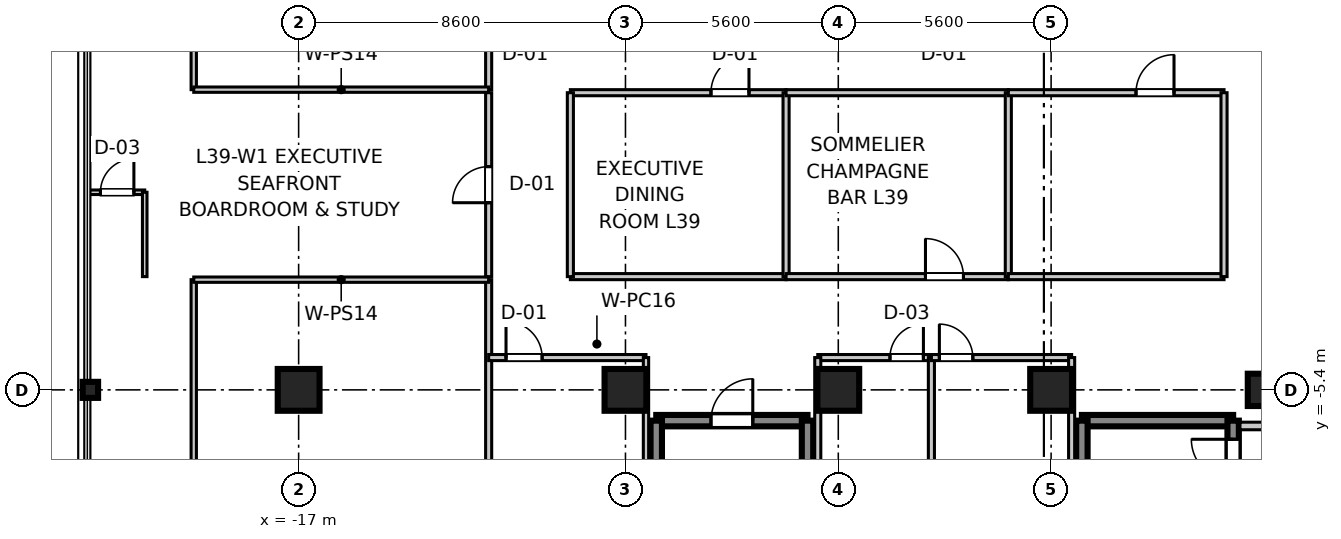
"""IFC4 building model, lengths in metres.
Left out: names, types, materials, properties, quantities, classifications, styles, units other than length and angle.
Written with IfcOpenShell. Run it as: python <this file> out.ifc"""

import sys

from ifc_helpers import new_model, si_unit, direction, frame, frame_2d, origin, origin_2d, place, context, subcontext, project, spatial, rectangle, i_section, extrude, source, transform, mapped, element, fill, save


model = new_model("IFC4")
c1 = context("Model", 3, precision=1e-05, world=origin(), true_north=direction((0.0, 1.0)))
c2 = subcontext(c1, "Body", "Model", "MODEL_VIEW")
j1 = project(units=[si_unit("LENGTHUNIT", "METRE"), si_unit("PLANEANGLEUNIT", "RADIAN")], contexts=[c1])
p1 = place(None, origin())
s1 = spatial("IfcSite", under=j1, at=p1, CompositionType="ELEMENT")
p2 = place(p1, origin())
s2 = spatial("IfcBuilding", under=s1, at=p2, CompositionType="ELEMENT")
p3 = place(p2, frame((0.0, 0.0, 156.3)))
s3 = spatial("IfcBuildingStorey", under=s2, at=p3, CompositionType="ELEMENT", Elevation=156.3)
m1 = source(origin(), c2, "Body", "SweptSolid", [
    extrude(rectangle(XDim=1.1, YDim=1.1, at=origin_2d()), origin(), (0.0, 0.0, 1.0), 3.605),
])
for number, where, z_axis, x_axis in (
    (1, (-17.0, -5.4, 0.0), (0.0, 0.0, 1.0), (1.0, 0.0, 0.0)),
    (2, (-8.4, -5.4, 0.0), (0.0, 0.0, 1.0), (1.0, 0.0, 0.0)),
    (3, (-2.8, -5.4, 0.0), (0.0, 0.0, 1.0), (1.0, 0.0, 0.0)),
    (4, (2.8, -5.4, 0.0), (0.0, 0.0, 1.0), (1.0, 0.0, 0.0)),
):
    element("IfcColumn", number, at=place(p3, frame(where, z_axis=z_axis, x_axis=x_axis)), inside=s3, PredefinedType="COLUMN", context=c2, shape_type="MappedRepresentation", body=[
        mapped(m1, transform((0.0, 0.0, 0.0), scale=1.0)),
    ])
m2 = source(origin(), c2, "Body", "SweptSolid", [
    extrude(rectangle(XDim=0.85, YDim=0.85, at=origin_2d()), origin(), (0.0, 0.0, 1.0), 3.605),
])
p4 = place(p3, frame((8.4, -5.4, 0.0), z_axis=(0.0, 0.0, 1.0), x_axis=(1.0, 0.0, 0.0)))
e5 = element("IfcColumn", 5, at=p4, inside=s3, PredefinedType="PILASTER", context=c2, shape_type="MappedRepresentation", body=[
    mapped(m2, transform((0.0, 0.0, 0.0), scale=1.0)),
])
m3 = source(origin(), c2, "Body", "SweptSolid", [
    extrude(i_section(OverallWidth=0.406, OverallDepth=0.422, WebThickness=0.019, FlangeThickness=0.03, at=origin_2d()), origin(), (0.0, 0.0, 1.0), 3.605),
])
p5 = place(p3, frame((-22.48, -5.4, 0.0), z_axis=(0.0, 0.0, 1.0), x_axis=(1.0, 0.0, 0.0)))
e6 = element("IfcColumn", 6, at=p5, inside=s3, PredefinedType="COLUMN", context=c2, shape_type="MappedRepresentation", body=[
    mapped(m3, transform((0.0, 0.0, 0.0), scale=1.0)),
])
m4 = source(origin(), c2, "Body", "SweptSolid", [
    extrude(rectangle(XDim=3.98, YDim=0.3, at=frame_2d((1.99, 0.0))), origin(), (0.0, 0.0, 1.0), 3.39),
])
p6 = place(p3, frame((3.61, -6.21, 0.0), z_axis=(0.0, 0.0, 1.0), x_axis=(1.0, 0.0, 0.0)))
e7 = element("IfcWall", 7, at=p6, inside=s3, PredefinedType="SHEAR", context=c2, shape_type="MappedRepresentation", body=[
    mapped(m4, transform((0.0, 0.0, 0.0), scale=1.0)),
])
m5 = source(origin(), c2, "Body", "SweptSolid", [
    extrude(rectangle(XDim=9.38, YDim=0.3, at=frame_2d((4.69, 0.0))), origin(), (0.0, 0.0, 1.0), 3.39),
])
p7 = place(p3, frame((3.61, -15.59, 0.0), z_axis=(0.0, 0.0, 1.0), x_axis=(0.0, 1.0, 0.0)))
e8 = element("IfcWall", 8, at=p7, inside=s3, PredefinedType="SHEAR", context=c2, shape_type="MappedRepresentation", body=[
    mapped(m5, transform((0.0, 0.0, 0.0), scale=1.0)),
])
p8 = place(p3, frame((7.59, -15.59, 0.0), z_axis=(0.0, 0.0, 1.0), x_axis=(0.0, 1.0, 0.0)))
e9 = element("IfcWall", 9, at=p8, inside=s3, PredefinedType="SHEAR", context=c2, shape_type="MappedRepresentation", body=[
    mapped(m5, transform((0.0, 0.0, 0.0), scale=1.0)),
])
p9 = place(p8, frame((7.79, 0.0, 0.0)))
e10 = element("IfcOpeningElement", 10, at=p9, cuts=e9, PredefinedType="OPENING", context=c2, shape_type="SweptSolid", body=[
    extrude(rectangle(XDim=1.1, YDim=2.15, at=frame_2d((0.55, 1.075))), frame((0.0, 0.16, 0.0), z_axis=(0.0, -1.0, 0.0), x_axis=(1.0, 0.0, 0.0)), (0.0, 0.0, 1.0), 0.32),
])
p10 = place(p3, frame((-7.59, -6.21, 0.0), z_axis=(0.0, 0.0, 1.0), x_axis=(1.0, 0.0, 0.0)))
e11 = element("IfcWall", 11, at=p10, inside=s3, PredefinedType="SHEAR", context=c2, shape_type="MappedRepresentation", body=[
    mapped(m4, transform((0.0, 0.0, 0.0), scale=1.0)),
])
p11 = place(p10, frame((1.44, 0.0, 0.0)))
e12 = element("IfcOpeningElement", 12, at=p11, cuts=e11, PredefinedType="OPENING", context=c2, shape_type="SweptSolid", body=[
    extrude(rectangle(XDim=1.1, YDim=2.15, at=frame_2d((0.55, 1.075))), frame((0.0, 0.16, 0.0), z_axis=(0.0, -1.0, 0.0), x_axis=(1.0, 0.0, 0.0)), (0.0, 0.0, 1.0), 0.32),
])
for number, where, z_axis, x_axis in (
    (13, (-7.59, -15.59, 0.0), (0.0, 0.0, 1.0), (0.0, 1.0, 0.0)),
    (14, (-3.61, -15.59, 0.0), (0.0, 0.0, 1.0), (0.0, 1.0, 0.0)),
):
    element("IfcWall", number, at=place(p3, frame(where, z_axis=z_axis, x_axis=x_axis)), inside=s3, PredefinedType="SHEAR", context=c2, shape_type="MappedRepresentation", body=[
        mapped(m5, transform((0.0, 0.0, 0.0), scale=1.0)),
    ])
m6 = source(origin(), c2, "Body", "SweptSolid", [
    extrude(rectangle(XDim=0.97, YDim=0.2, at=frame_2d((0.485, 0.0))), origin(), (0.0, 0.0, 1.0), 2.73),
])
p12 = place(p3, frame((7.77, -6.35, 0.0), z_axis=(0.0, 0.0, 1.0), x_axis=(1.0, 0.0, 0.0)))
e15 = element("IfcWall", 15, at=p12, inside=s3, PredefinedType="PARTITIONING", context=c2, shape_type="MappedRepresentation", body=[
    mapped(m6, transform((0.0, 0.0, 0.0), scale=1.0)),
])
m7 = source(origin(), c2, "Body", "SweptSolid", [
    extrude(rectangle(XDim=20.0, YDim=0.16, at=frame_2d((10.0, 0.0))), origin(), (0.0, 0.0, 1.0), 2.73),
])
p13 = place(p3, frame((-12.0, 2.5, 0.0), z_axis=(0.0, 0.0, 1.0), x_axis=(0.0, 1.0, 0.0)))
e16 = element("IfcWall", 16, at=p13, inside=s3, PredefinedType="PARTITIONING", context=c2, shape_type="MappedRepresentation", body=[
    mapped(m7, transform((0.0, 0.0, 0.0), scale=1.0)),
])
p14 = place(p13, frame((8.265, 0.0, 0.0)))
e17 = element("IfcOpeningElement", 17, at=p14, cuts=e16, PredefinedType="OPENING", context=c2, shape_type="SweptSolid", body=[
    extrude(rectangle(XDim=0.95, YDim=2.1, at=frame_2d((0.475, 1.05))), frame((0.0, 0.09, 0.0), z_axis=(0.0, -1.0, 0.0), x_axis=(1.0, 0.0, 0.0)), (0.0, 0.0, 1.0), 0.18),
])
m8 = source(origin(), c2, "Body", "SweptSolid", [
    extrude(rectangle(XDim=18.58, YDim=0.14, at=frame_2d((9.29, 0.0))), origin(), (0.0, 0.0, 1.0), 2.73),
])
p15 = place(p3, frame((-19.76, 2.5, 0.0), z_axis=(0.0, 0.0, 1.0), x_axis=(0.0, 1.0, 0.0)))
e18 = element("IfcWall", 18, at=p15, inside=s3, PredefinedType="PARTITIONING", context=c2, shape_type="MappedRepresentation", body=[
    mapped(m8, transform((0.0, 0.0, 0.0), scale=1.0)),
])
m9 = source(origin(), c2, "Body", "SweptSolid", [
    extrude(rectangle(XDim=7.76, YDim=0.14, at=frame_2d((3.88, 0.0))), origin(), (0.0, 0.0, 1.0), 2.73),
])
p16 = place(p3, frame((-19.76, 2.5, 0.0), z_axis=(0.0, 0.0, 1.0), x_axis=(1.0, 0.0, 0.0)))
e19 = element("IfcWall", 19, at=p16, inside=s3, PredefinedType="PARTITIONING", context=c2, shape_type="MappedRepresentation", body=[
    mapped(m9, transform((0.0, 0.0, 0.0), scale=1.0)),
])
p17 = place(p3, frame((-12.0, -22.5, 0.0), z_axis=(0.0, 0.0, 1.0), x_axis=(0.0, 1.0, 0.0)))
e20 = element("IfcWall", 20, at=p17, inside=s3, PredefinedType="PARTITIONING", context=c2, shape_type="MappedRepresentation", body=[
    mapped(m7, transform((0.0, 0.0, 0.0), scale=1.0)),
])
p18 = place(p17, frame((10.785, 0.0, 0.0)))
e21 = element("IfcOpeningElement", 21, at=p18, cuts=e20, PredefinedType="OPENING", context=c2, shape_type="SweptSolid", body=[
    extrude(rectangle(XDim=0.95, YDim=2.1, at=frame_2d((0.475, 1.05))), frame((0.0, 0.09, 0.0), z_axis=(0.0, -1.0, 0.0), x_axis=(1.0, 0.0, 0.0)), (0.0, 0.0, 1.0), 0.18),
])
p19 = place(p3, frame((-19.76, -21.08, 0.0), z_axis=(0.0, 0.0, 1.0), x_axis=(0.0, 1.0, 0.0)))
e22 = element("IfcWall", 22, at=p19, inside=s3, PredefinedType="PARTITIONING", context=c2, shape_type="MappedRepresentation", body=[
    mapped(m8, transform((0.0, 0.0, 0.0), scale=1.0)),
])
p20 = place(p3, frame((-19.76, -2.5, 0.0), z_axis=(0.0, 0.0, 1.0), x_axis=(1.0, 0.0, 0.0)))
e23 = element("IfcWall", 23, at=p20, inside=s3, PredefinedType="PARTITIONING", context=c2, shape_type="MappedRepresentation", body=[
    mapped(m9, transform((0.0, 0.0, 0.0), scale=1.0)),
])
m10 = source(origin(), c2, "Body", "SweptSolid", [
    extrude(rectangle(XDim=4.14, YDim=0.16, at=frame_2d((2.07, 0.0))), origin(), (0.0, 0.0, 1.0), 2.73),
])
p21 = place(p3, frame((-12.0, -4.55, 0.0), z_axis=(0.0, 0.0, 1.0), x_axis=(1.0, 0.0, 0.0)))
e24 = element("IfcWall", 24, at=p21, inside=s3, PredefinedType="PARTITIONING", context=c2, shape_type="MappedRepresentation", body=[
    mapped(m10, transform((0.0, 0.0, 0.0), scale=1.0)),
])
p22 = place(p21, frame((0.457, 0.0, 0.0)))
e25 = element("IfcOpeningElement", 25, at=p22, cuts=e24, PredefinedType="OPENING", context=c2, shape_type="SweptSolid", body=[
    extrude(rectangle(XDim=0.95, YDim=2.1, at=frame_2d((0.475, 1.05))), frame((0.0, 0.09, 0.0), z_axis=(0.0, -1.0, 0.0), x_axis=(1.0, 0.0, 0.0)), (0.0, 0.0, 1.0), 0.18),
])
m11 = source(origin(), c2, "Body", "SweptSolid", [
    extrude(rectangle(XDim=17.95, YDim=0.14, at=frame_2d((8.975, 0.0))), origin(), (0.0, 0.0, 1.0), 2.73),
])
p23 = place(p3, frame((-7.86, -22.5, 0.0), z_axis=(0.0, 0.0, 1.0), x_axis=(0.0, 1.0, 0.0)))
e26 = element("IfcWall", 26, at=p23, inside=s3, PredefinedType="PARTITIONING", context=c2, shape_type="MappedRepresentation", body=[
    mapped(m11, transform((0.0, 0.0, 0.0), scale=1.0)),
])
m12 = source(origin(), c2, "Body", "SweptSolid", [
    extrude(rectangle(XDim=2.99, YDim=0.16, at=frame_2d((1.495, 0.0))), origin(), (0.0, 0.0, 1.0), 2.73),
])
p24 = place(p3, frame((-3.34, -4.55, 0.0), z_axis=(0.0, 0.0, 1.0), x_axis=(1.0, 0.0, 0.0)))
e27 = element("IfcWall", 27, at=p24, inside=s3, PredefinedType="PARTITIONING", context=c2, shape_type="MappedRepresentation", body=[
    mapped(m12, transform((0.0, 0.0, 0.0), scale=1.0)),
])
p25 = place(p24, frame((1.9, 0.0, 0.0)))
e28 = element("IfcOpeningElement", 28, at=p25, cuts=e27, PredefinedType="OPENING", context=c2, shape_type="SweptSolid", body=[
    extrude(rectangle(XDim=0.88, YDim=2.1, at=frame_2d((0.44, 1.05))), frame((0.0, 0.09, 0.0), z_axis=(0.0, -1.0, 0.0), x_axis=(1.0, 0.0, 0.0)), (0.0, 0.0, 1.0), 0.18),
])
m13 = source(origin(), c2, "Body", "SweptSolid", [
    extrude(rectangle(XDim=17.95, YDim=0.16, at=frame_2d((8.975, 0.0))), origin(), (0.0, 0.0, 1.0), 2.73),
])
for number, where, z_axis, x_axis in (
    (29, (-3.34, -22.5, 0.0), (0.0, 0.0, 1.0), (0.0, 1.0, 0.0)),
    (30, (-0.35, -22.5, 0.0), (0.0, 0.0, 1.0), (0.0, 1.0, 0.0)),
):
    element("IfcWall", number, at=place(p3, frame(where, z_axis=z_axis, x_axis=x_axis)), inside=s3, PredefinedType="PARTITIONING", context=c2, shape_type="MappedRepresentation", body=[
        mapped(m13, transform((0.0, 0.0, 0.0), scale=1.0)),
    ])
m14 = source(origin(), c2, "Body", "SweptSolid", [
    extrude(rectangle(XDim=3.69, YDim=0.16, at=frame_2d((1.845, 0.0))), origin(), (0.0, 0.0, 1.0), 2.73),
])
p26 = place(p3, frame((-0.35, -4.55, 0.0), z_axis=(0.0, 0.0, 1.0), x_axis=(1.0, 0.0, 0.0)))
e31 = element("IfcWall", 31, at=p26, inside=s3, PredefinedType="PARTITIONING", context=c2, shape_type="MappedRepresentation", body=[
    mapped(m14, transform((0.0, 0.0, 0.0), scale=1.0)),
])
p27 = place(p26, frame((0.21, 0.0, 0.0)))
e32 = element("IfcOpeningElement", 32, at=p27, cuts=e31, PredefinedType="OPENING", context=c2, shape_type="SweptSolid", body=[
    extrude(rectangle(XDim=0.88, YDim=2.1, at=frame_2d((0.44, 1.05))), frame((0.0, 0.09, 0.0), z_axis=(0.0, -1.0, 0.0), x_axis=(1.0, 0.0, 0.0)), (0.0, 0.0, 1.0), 0.18),
])
p28 = place(p3, frame((3.34, -22.5, 0.0), z_axis=(0.0, 0.0, 1.0), x_axis=(0.0, 1.0, 0.0)))
e33 = element("IfcWall", 33, at=p28, inside=s3, PredefinedType="PARTITIONING", context=c2, shape_type="MappedRepresentation", body=[
    mapped(m13, transform((0.0, 0.0, 0.0), scale=1.0)),
])
m15 = source(origin(), c2, "Body", "SweptSolid", [
    extrude(rectangle(XDim=4.84, YDim=0.16, at=frame_2d((2.42, 0.0))), origin(), (0.0, 0.0, 1.0), 2.73),
])
p29 = place(p3, frame((-12.0, -2.42, 0.0), z_axis=(0.0, 0.0, 1.0), x_axis=(0.0, 1.0, 0.0)))
e34 = element("IfcWall", 34, at=p29, inside=s3, PredefinedType="PARTITIONING", context=c2, shape_type="MappedRepresentation", body=[
    mapped(m15, transform((0.0, 0.0, 0.0), scale=1.0)),
])
p30 = place(p29, frame((1.945, 0.0, 0.0)))
e35 = element("IfcOpeningElement", 35, at=p30, cuts=e34, PredefinedType="OPENING", context=c2, shape_type="SweptSolid", body=[
    extrude(rectangle(XDim=0.95, YDim=2.1, at=frame_2d((0.475, 1.05))), frame((0.0, 0.09, 0.0), z_axis=(0.0, -1.0, 0.0), x_axis=(1.0, 0.0, 0.0)), (0.0, 0.0, 1.0), 0.18),
])
m16 = source(origin(), c2, "Body", "SweptSolid", [
    extrude(rectangle(XDim=1.45, YDim=0.12, at=frame_2d((0.725, 0.0))), origin(), (0.0, 0.0, 1.0), 2.73),
])
p31 = place(p3, frame((-22.5, -0.2, 0.0), z_axis=(0.0, 0.0, 1.0), x_axis=(1.0, 0.0, 0.0)))
e36 = element("IfcWall", 36, at=p31, inside=s3, PredefinedType="PARTITIONING", context=c2, shape_type="MappedRepresentation", body=[
    mapped(m16, transform((0.0, 0.0, 0.0), scale=1.0)),
])
p32 = place(p31, frame((0.285, 0.0, 0.0)))
e37 = element("IfcOpeningElement", 37, at=p32, cuts=e36, PredefinedType="OPENING", context=c2, shape_type="SweptSolid", body=[
    extrude(rectangle(XDim=0.88, YDim=2.1, at=frame_2d((0.44, 1.05))), frame((0.0, 0.07, 0.0), z_axis=(0.0, -1.0, 0.0), x_axis=(1.0, 0.0, 0.0)), (0.0, 0.0, 1.0), 0.14),
])
m17 = source(origin(), c2, "Body", "SweptSolid", [
    extrude(rectangle(XDim=2.22, YDim=0.12, at=frame_2d((1.11, 0.0))), origin(), (0.0, 0.0, 1.0), 2.73),
])
p33 = place(p3, frame((-21.05, -2.42, 0.0), z_axis=(0.0, 0.0, 1.0), x_axis=(0.0, 1.0, 0.0)))
e38 = element("IfcWall", 38, at=p33, inside=s3, PredefinedType="PARTITIONING", context=c2, shape_type="MappedRepresentation", body=[
    mapped(m17, transform((0.0, 0.0, 0.0), scale=1.0)),
])
m18 = source(origin(), c2, "Body", "SweptSolid", [
    extrude(rectangle(XDim=5.676, YDim=0.16, at=frame_2d((2.838, 0.0))), origin(), (0.0, 0.0, 1.0), 2.73),
])
p34 = place(p3, frame((-9.85, -2.42, 0.0), z_axis=(0.0, 0.0, 1.0), x_axis=(1.0, 0.0, 0.0)))
e39 = element("IfcWall", 39, at=p34, inside=s3, PredefinedType="PARTITIONING", context=c2, shape_type="MappedRepresentation", body=[
    mapped(m18, transform((0.0, 0.0, 0.0), scale=1.0)),
])
p35 = place(p3, frame((-9.85, 2.42, 0.0), z_axis=(0.0, 0.0, 1.0), x_axis=(1.0, 0.0, 0.0)))
e40 = element("IfcWall", 40, at=p35, inside=s3, PredefinedType="PARTITIONING", context=c2, shape_type="MappedRepresentation", body=[
    mapped(m18, transform((0.0, 0.0, 0.0), scale=1.0)),
])
p36 = place(p35, frame((3.7, 0.0, 0.0)))
e41 = element("IfcOpeningElement", 41, at=p36, cuts=e40, PredefinedType="OPENING", context=c2, shape_type="SweptSolid", body=[
    extrude(rectangle(XDim=1.0, YDim=2.1, at=frame_2d((0.5, 1.05))), frame((0.0, 0.09, 0.0), z_axis=(0.0, -1.0, 0.0), x_axis=(1.0, 0.0, 0.0)), (0.0, 0.0, 1.0), 0.18),
])
for number, where, z_axis, x_axis in (
    (42, (-9.85, -2.42, 0.0), (0.0, 0.0, 1.0), (0.0, 1.0, 0.0)),
    (43, (-4.174, -2.42, 0.0), (0.0, 0.0, 1.0), (0.0, 1.0, 0.0)),
):
    element("IfcWall", number, at=place(p3, frame(where, z_axis=z_axis, x_axis=x_axis)), inside=s3, PredefinedType="PARTITIONING", context=c2, shape_type="MappedRepresentation", body=[
        mapped(m15, transform((0.0, 0.0, 0.0), scale=1.0)),
    ])
m19 = source(origin(), c2, "Body", "SweptSolid", [
    extrude(rectangle(XDim=5.848, YDim=0.16, at=frame_2d((2.924, 0.0))), origin(), (0.0, 0.0, 1.0), 2.73),
])
p37 = place(p3, frame((-4.174, -2.42, 0.0), z_axis=(0.0, 0.0, 1.0), x_axis=(1.0, 0.0, 0.0)))
e44 = element("IfcWall", 44, at=p37, inside=s3, PredefinedType="PARTITIONING", context=c2, shape_type="MappedRepresentation", body=[
    mapped(m19, transform((0.0, 0.0, 0.0), scale=1.0)),
])
p38 = place(p37, frame((3.668, 0.0, 0.0)))
e45 = element("IfcOpeningElement", 45, at=p38, cuts=e44, PredefinedType="OPENING", context=c2, shape_type="SweptSolid", body=[
    extrude(rectangle(XDim=1.0, YDim=2.1, at=frame_2d((0.5, 1.05))), frame((0.0, 0.09, 0.0), z_axis=(0.0, -1.0, 0.0), x_axis=(1.0, 0.0, 0.0)), (0.0, 0.0, 1.0), 0.18),
])
p39 = place(p3, frame((-4.174, 2.42, 0.0), z_axis=(0.0, 0.0, 1.0), x_axis=(1.0, 0.0, 0.0)))
e46 = element("IfcWall", 46, at=p39, inside=s3, PredefinedType="PARTITIONING", context=c2, shape_type="MappedRepresentation", body=[
    mapped(m19, transform((0.0, 0.0, 0.0), scale=1.0)),
])
p40 = place(p3, frame((1.674, -2.42, 0.0), z_axis=(0.0, 0.0, 1.0), x_axis=(0.0, 1.0, 0.0)))
e47 = element("IfcWall", 47, at=p40, inside=s3, PredefinedType="PARTITIONING", context=c2, shape_type="MappedRepresentation", body=[
    mapped(m15, transform((0.0, 0.0, 0.0), scale=1.0)),
])
p41 = place(p3, frame((1.674, -2.42, 0.0), z_axis=(0.0, 0.0, 1.0), x_axis=(1.0, 0.0, 0.0)))
e48 = element("IfcWall", 48, at=p41, inside=s3, PredefinedType="PARTITIONING", context=c2, shape_type="MappedRepresentation", body=[
    mapped(m18, transform((0.0, 0.0, 0.0), scale=1.0)),
])
p42 = place(p3, frame((1.674, 2.42, 0.0), z_axis=(0.0, 0.0, 1.0), x_axis=(1.0, 0.0, 0.0)))
e49 = element("IfcWall", 49, at=p42, inside=s3, PredefinedType="PARTITIONING", context=c2, shape_type="MappedRepresentation", body=[
    mapped(m18, transform((0.0, 0.0, 0.0), scale=1.0)),
])
p43 = place(p42, frame((3.36, 0.0, 0.0)))
e50 = element("IfcOpeningElement", 50, at=p43, cuts=e49, PredefinedType="OPENING", context=c2, shape_type="SweptSolid", body=[
    extrude(rectangle(XDim=1.0, YDim=2.1, at=frame_2d((0.5, 1.05))), frame((0.0, 0.09, 0.0), z_axis=(0.0, -1.0, 0.0), x_axis=(1.0, 0.0, 0.0)), (0.0, 0.0, 1.0), 0.18),
])
p44 = place(p3, frame((7.35, -2.42, 0.0), z_axis=(0.0, 0.0, 1.0), x_axis=(0.0, 1.0, 0.0)))
e51 = element("IfcWall", 51, at=p44, inside=s3, PredefinedType="PARTITIONING", context=c2, shape_type="MappedRepresentation", body=[
    mapped(m15, transform((0.0, 0.0, 0.0), scale=1.0)),
])
m20 = source(origin(), c2, "Body", "SweptSolid", [
    extrude(rectangle(XDim=1.1, YDim=2.15, at=frame_2d((0.55, 1.075))), frame((0.0, 0.025, 0.0), z_axis=(0.0, -1.0, 0.0), x_axis=(1.0, 0.0, 0.0)), (0.0, 0.0, 1.0), 0.05),
])
p45 = place(p9, origin())
e52 = element("IfcDoor", 52, at=p45, inside=s3, OperationType="SINGLE_SWING_RIGHT", PredefinedType="DOOR", context=c2, shape_type="MappedRepresentation", body=[
    mapped(m20, transform((0.0, 0.0, 0.0), scale=1.0)),
])
fill(e10, e52)
p46 = place(p11, frame((1.1, 0.0, 0.0), z_axis=(0.0, 0.0, 1.0), x_axis=(-1.0, 0.0, 0.0)))
e53 = element("IfcDoor", 53, at=p46, inside=s3, OperationType="SINGLE_SWING_RIGHT", PredefinedType="DOOR", context=c2, shape_type="MappedRepresentation", body=[
    mapped(m20, transform((0.0, 0.0, 0.0), scale=1.0)),
])
fill(e12, e53)
m21 = source(origin(), c2, "Body", "SweptSolid", [
    extrude(rectangle(XDim=0.95, YDim=2.1, at=frame_2d((0.475, 1.05))), frame((0.0, 0.025, 0.0), z_axis=(0.0, -1.0, 0.0), x_axis=(1.0, 0.0, 0.0)), (0.0, 0.0, 1.0), 0.05),
])
p47 = place(p22, frame((0.95, 0.0, 0.0), z_axis=(0.0, 0.0, 1.0), x_axis=(-1.0, 0.0, 0.0)))
e54 = element("IfcDoor", 54, at=p47, inside=s3, OperationType="SINGLE_SWING_LEFT", PredefinedType="DOOR", context=c2, shape_type="MappedRepresentation", body=[
    mapped(m21, transform((0.0, 0.0, 0.0), scale=1.0)),
])
fill(e25, e54)
m22 = source(origin(), c2, "Body", "SweptSolid", [
    extrude(rectangle(XDim=0.88, YDim=2.1, at=frame_2d((0.44, 1.05))), frame((0.0, 0.025, 0.0), z_axis=(0.0, -1.0, 0.0), x_axis=(1.0, 0.0, 0.0)), (0.0, 0.0, 1.0), 0.05),
])
p48 = place(p25, frame((0.88, 0.0, 0.0), z_axis=(0.0, 0.0, 1.0), x_axis=(-1.0, 0.0, 0.0)))
e55 = element("IfcDoor", 55, at=p48, inside=s3, OperationType="SINGLE_SWING_RIGHT", PredefinedType="DOOR", context=c2, shape_type="MappedRepresentation", body=[
    mapped(m22, transform((0.0, 0.0, 0.0), scale=1.0)),
])
fill(e28, e55)
p49 = place(p27, frame((0.88, 0.0, 0.0), z_axis=(0.0, 0.0, 1.0), x_axis=(-1.0, 0.0, 0.0)))
e56 = element("IfcDoor", 56, at=p49, inside=s3, OperationType="SINGLE_SWING_LEFT", PredefinedType="DOOR", context=c2, shape_type="MappedRepresentation", body=[
    mapped(m22, transform((0.0, 0.0, 0.0), scale=1.0)),
])
fill(e32, e56)
p50 = place(p32, frame((0.88, 0.0, 0.0), z_axis=(0.0, 0.0, 1.0), x_axis=(-1.0, 0.0, 0.0)))
e57 = element("IfcDoor", 57, at=p50, inside=s3, OperationType="SINGLE_SWING_RIGHT", PredefinedType="DOOR", context=c2, shape_type="MappedRepresentation", body=[
    mapped(m22, transform((0.0, 0.0, 0.0), scale=1.0)),
])
fill(e37, e57)
p51 = place(p30, origin())
e58 = element("IfcDoor", 58, at=p51, inside=s3, OperationType="SINGLE_SWING_LEFT", PredefinedType="DOOR", context=c2, shape_type="MappedRepresentation", body=[
    mapped(m21, transform((0.0, 0.0, 0.0), scale=1.0)),
])
fill(e35, e58)
m23 = source(origin(), c2, "Body", "SweptSolid", [
    extrude(rectangle(XDim=1.0, YDim=2.1, at=frame_2d((0.5, 1.05))), frame((0.0, 0.025, 0.0), z_axis=(0.0, -1.0, 0.0), x_axis=(1.0, 0.0, 0.0)), (0.0, 0.0, 1.0), 0.05),
])
p52 = place(p36, frame((1.0, 0.0, 0.0), z_axis=(0.0, 0.0, 1.0), x_axis=(-1.0, 0.0, 0.0)))
e59 = element("IfcDoor", 59, at=p52, inside=s3, OperationType="SINGLE_SWING_RIGHT", PredefinedType="DOOR", context=c2, shape_type="MappedRepresentation", body=[
    mapped(m23, transform((0.0, 0.0, 0.0), scale=1.0)),
])
fill(e41, e59)
p53 = place(p38, origin())
e60 = element("IfcDoor", 60, at=p53, inside=s3, OperationType="SINGLE_SWING_LEFT", PredefinedType="DOOR", context=c2, shape_type="MappedRepresentation", body=[
    mapped(m23, transform((0.0, 0.0, 0.0), scale=1.0)),
])
fill(e45, e60)
p54 = place(p43, frame((1.0, 0.0, 0.0), z_axis=(0.0, 0.0, 1.0), x_axis=(-1.0, 0.0, 0.0)))
e61 = element("IfcDoor", 61, at=p54, inside=s3, OperationType="SINGLE_SWING_RIGHT", PredefinedType="DOOR", context=c2, shape_type="MappedRepresentation", body=[
    mapped(m23, transform((0.0, 0.0, 0.0), scale=1.0)),
])
fill(e50, e61)
save(model, sys.argv[1])
